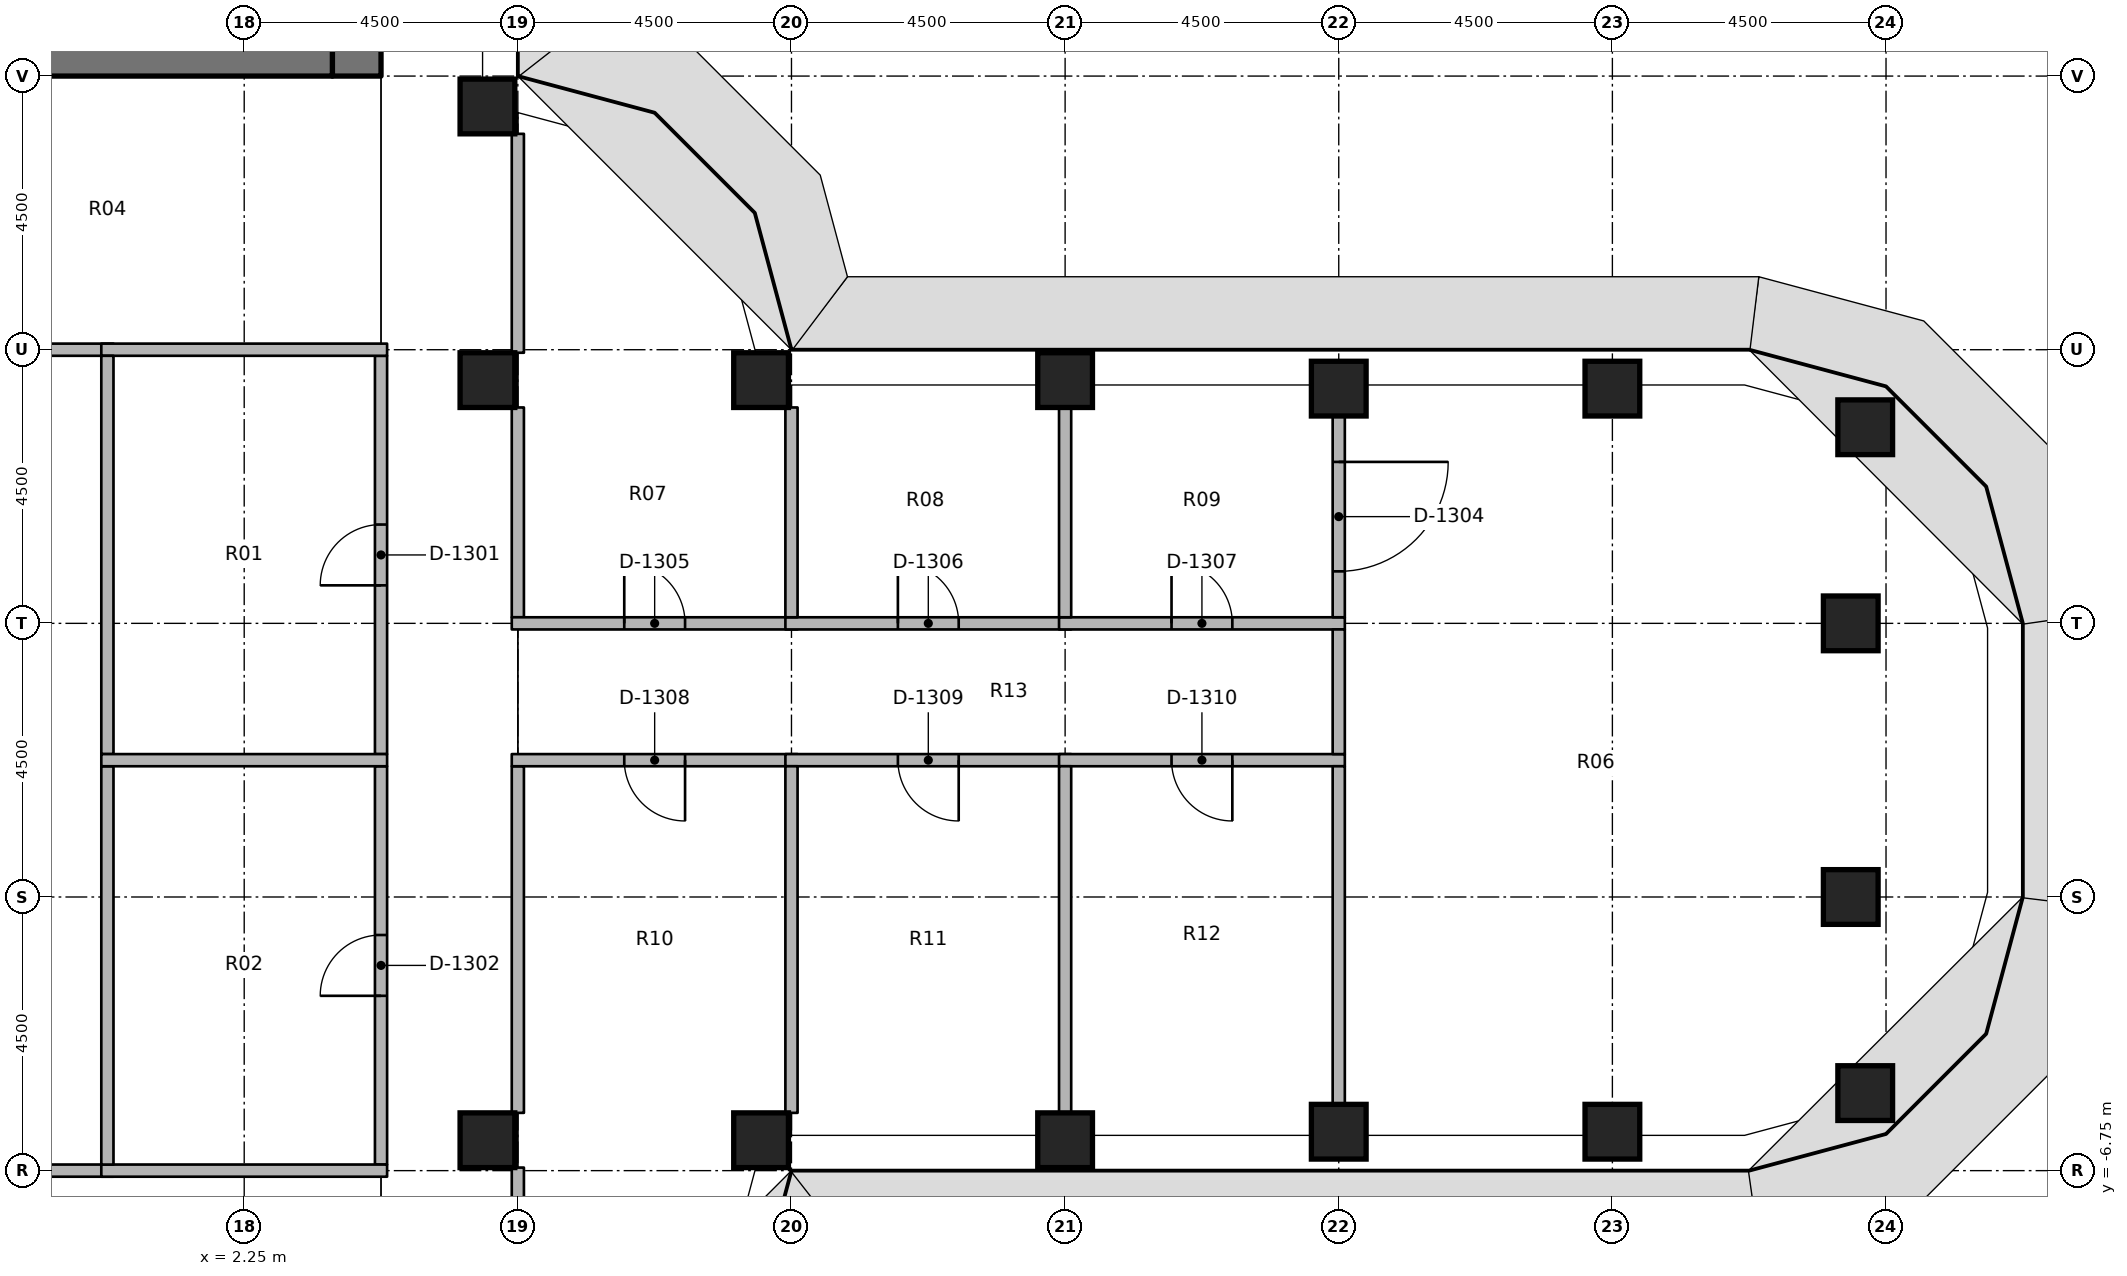
"""IFC4 building model, lengths in metres.
Left out: names, types, materials, properties, quantities, classifications, styles, units other than length and angle.
Written with IfcOpenShell. Run it as: python <this file> out.ifc"""

import sys

from ifc_helpers import new_model, si_unit, direction, frame, frame_2d, origin, origin_2d, place, context, subcontext, project, spatial, rectangle, extrude, element, fill, save


model = new_model("IFC4")
c1 = context("Model", 3, precision=1e-05, world=origin(), true_north=direction((0.0, 1.0)))
c2 = subcontext(c1, "Body", "Model", "MODEL_VIEW")
j1 = project(units=[si_unit("LENGTHUNIT", "METRE"), si_unit("PLANEANGLEUNIT", "RADIAN")], contexts=[c1])
p1 = place(None, origin())
s1 = spatial("IfcSite", under=j1, at=p1, CompositionType="ELEMENT")
p2 = place(p1, origin())
s2 = spatial("IfcBuilding", under=s1, at=p2, CompositionType="ELEMENT")
p3 = place(p2, frame((0.0, 0.0, 132.2)))
s3 = spatial("IfcBuildingStorey", under=s2, at=p3, CompositionType="ELEMENT", Elevation=132.2)
for number, where, z_axis, x_axis in (
    (1, (6.25, -6.25, 0.0), (0.0, 0.0, 1.0), (1.0, 0.0, 0.0)),
    (2, (6.25, 6.25, 0.0), (0.0, 0.0, 1.0), (1.0, 0.0, 0.0)),
    (3, (6.25, 10.75, 0.0), (0.0, 0.0, 1.0), (1.0, 0.0, 0.0)),
    (4, (10.75, -6.25, 0.0), (0.0, 0.0, 1.0), (1.0, 0.0, 0.0)),
    (5, (10.75, 6.25, 0.0), (0.0, 0.0, 1.0), (1.0, 0.0, 0.0)),
    (6, (15.75, -6.25, 0.0), (0.0, 0.0, 1.0), (1.0, 0.0, 0.0)),
    (7, (15.75, 6.25, 0.0), (0.0, 0.0, 1.0), (1.0, 0.0, 0.0)),
    (8, (20.25, -6.11, 0.0), (0.0, 0.0, 1.0), (1.0, 0.0, 0.0)),
    (9, (20.25, 6.11, 0.0), (0.0, 0.0, 1.0), (1.0, 0.0, 0.0)),
    (10, (24.75, -6.11, 0.0), (0.0, 0.0, 1.0), (1.0, 0.0, 0.0)),
    (11, (24.75, 6.11, 0.0), (0.0, 0.0, 1.0), (1.0, 0.0, 0.0)),
    (12, (28.908, -5.475, 0.0), (0.0, 0.0, 1.0), (1.0, 0.0, 0.0)),
    (13, (28.67, -2.25, 0.0), (0.0, 0.0, 1.0), (1.0, 0.0, 0.0)),
    (14, (28.67, 2.25, 0.0), (0.0, 0.0, 1.0), (1.0, 0.0, 0.0)),
    (15, (28.908, 5.475, 0.0), (0.0, 0.0, 1.0), (1.0, 0.0, 0.0)),
):
    element("IfcColumn", number, at=place(p3, frame(where, z_axis=z_axis, x_axis=x_axis)), inside=s3, PredefinedType="COLUMN", context=c2, shape_type="SweptSolid", body=[
        extrude(rectangle(XDim=0.9, YDim=0.9, at=origin_2d()), origin(), (0.0, 0.0, 1.0), 3.65),
    ])
p4 = place(p3, frame((4.1, 11.25, 0.0), z_axis=(0.0, 0.0, 1.0), x_axis=(0.0, 1.0, 0.0)))
e16 = element("IfcWall", 16, at=p4, inside=s3, PredefinedType="SHEAR", context=c2, shape_type="SweptSolid", body=[
    extrude(rectangle(XDim=15.0, YDim=0.8, at=frame_2d((7.5, 0.0))), origin(), (0.0, 0.0, 1.0), 3.8),
])
p5 = place(p4, frame((7.15, 0.0, 0.0)))
e17 = element("IfcOpeningElement", 17, at=p5, cuts=e16, PredefinedType="OPENING", context=c2, shape_type="SweptSolid", body=[
    extrude(rectangle(XDim=1.5, YDim=2.3, at=frame_2d((0.75, 1.15))), frame((0.0, 0.41, 0.0), z_axis=(0.0, -1.0, 0.0), x_axis=(1.0, 0.0, 0.0)), (0.0, 0.0, 1.0), 0.82),
])
p6 = place(p4, frame((5.55, 0.0, 0.0)))
e18 = element("IfcOpeningElement", 18, at=p6, cuts=e16, PredefinedType="OPENING", context=c2, shape_type="SweptSolid", body=[
    extrude(rectangle(XDim=1.2, YDim=2.1, at=frame_2d((0.6, 1.05))), frame((0.0, 0.41, 0.0), z_axis=(0.0, -1.0, 0.0), x_axis=(1.0, 0.0, 0.0)), (0.0, 0.0, 1.0), 0.82),
])
p7 = place(p3, frame((-3.7, 11.65, 0.0), z_axis=(0.0, 0.0, 1.0), x_axis=(1.0, 0.0, 0.0)))
e19 = element("IfcWall", 19, at=p7, inside=s3, PredefinedType="SHEAR", context=c2, shape_type="SweptSolid", body=[
    extrude(rectangle(XDim=7.4, YDim=0.8, at=frame_2d((3.7, 0.0))), origin(), (0.0, 0.0, 1.0), 3.8),
])
p8 = place(p3, frame((4.5, 0.1, 0.0), z_axis=(0.0, 0.0, 1.0), x_axis=(0.0, 1.0, 0.0)))
e20 = element("IfcWall", 20, at=p8, inside=s3, PredefinedType="PARTITIONING", context=c2, shape_type="SweptSolid", body=[
    extrude(rectangle(XDim=6.55, YDim=0.2, at=frame_2d((3.275, 0.0))), origin(), (0.0, 0.0, 1.0), 2.738),
])
p9 = place(p8, frame((2.775, 0.0, 0.0)))
e21 = element("IfcOpeningElement", 21, at=p9, cuts=e20, PredefinedType="OPENING", context=c2, shape_type="SweptSolid", body=[
    extrude(rectangle(XDim=1.0, YDim=2.1, at=frame_2d((0.5, 1.05))), frame((0.0, 0.11, 0.0), z_axis=(0.0, -1.0, 0.0), x_axis=(1.0, 0.0, 0.0)), (0.0, 0.0, 1.0), 0.22),
])
p10 = place(p3, frame((4.5, -6.65, 0.0), z_axis=(0.0, 0.0, 1.0), x_axis=(0.0, 1.0, 0.0)))
e22 = element("IfcWall", 22, at=p10, inside=s3, PredefinedType="PARTITIONING", context=c2, shape_type="SweptSolid", body=[
    extrude(rectangle(XDim=6.55, YDim=0.2, at=frame_2d((3.275, 0.0))), origin(), (0.0, 0.0, 1.0), 2.738),
])
p11 = place(p10, frame((2.775, 0.0, 0.0)))
e23 = element("IfcOpeningElement", 23, at=p11, cuts=e22, PredefinedType="OPENING", context=c2, shape_type="SweptSolid", body=[
    extrude(rectangle(XDim=1.0, YDim=2.1, at=frame_2d((0.5, 1.05))), frame((0.0, 0.11, 0.0), z_axis=(0.0, -1.0, 0.0), x_axis=(1.0, 0.0, 0.0)), (0.0, 0.0, 1.0), 0.22),
])
p12 = place(p3, frame((6.75, 2.35, 0.0), z_axis=(0.0, 0.0, 1.0), x_axis=(0.0, 1.0, 0.0)))
e24 = element("IfcWall", 24, at=p12, inside=s3, PredefinedType="PARTITIONING", context=c2, shape_type="SweptSolid", body=[
    extrude(rectangle(XDim=3.45, YDim=0.2, at=frame_2d((1.725, 0.0))), origin(), (0.0, 0.0, 1.0), 2.738),
])
for number, where, z_axis, x_axis in (
    (25, (6.75, 6.7, 0.0), (0.0, 0.0, 1.0), (0.0, 1.0, 0.0)),
    (26, (6.75, -10.3, 0.0), (0.0, 0.0, 1.0), (0.0, 1.0, 0.0)),
):
    element("IfcWall", number, at=place(p3, frame(where, z_axis=z_axis, x_axis=x_axis)), inside=s3, PredefinedType="PARTITIONING", context=c2, shape_type="SweptSolid", body=[
        extrude(rectangle(XDim=3.6, YDim=0.2, at=frame_2d((1.8, 0.0))), origin(), (0.0, 0.0, 1.0), 2.738),
    ])
p13 = place(p3, frame((6.75, -5.8, 0.0), z_axis=(0.0, 0.0, 1.0), x_axis=(0.0, 1.0, 0.0)))
e27 = element("IfcWall", 27, at=p13, inside=s3, PredefinedType="PARTITIONING", context=c2, shape_type="SweptSolid", body=[
    extrude(rectangle(XDim=5.7, YDim=0.2, at=frame_2d((2.85, 0.0))), origin(), (0.0, 0.0, 1.0), 2.738),
])
for number, where, z_axis, x_axis in (
    (28, (-4.6, 6.75, 0.0), (0.0, 0.0, 1.0), (1.0, 0.0, 0.0)),
    (29, (-0.1, 6.75, 0.0), (0.0, 0.0, 1.0), (1.0, 0.0, 0.0)),
    (30, (-4.6, -6.75, 0.0), (0.0, 0.0, 1.0), (1.0, 0.0, 0.0)),
    (31, (-0.1, -6.75, 0.0), (0.0, 0.0, 1.0), (1.0, 0.0, 0.0)),
):
    element("IfcWall", number, at=place(p3, frame(where, z_axis=z_axis, x_axis=x_axis)), inside=s3, PredefinedType="PARTITIONING", context=c2, shape_type="SweptSolid", body=[
        extrude(rectangle(XDim=4.7, YDim=0.2, at=frame_2d((2.35, 0.0))), origin(), (0.0, 0.0, 1.0), 2.738),
    ])
for number, where, z_axis, x_axis in (
    (32, (0.0, 0.1, 0.0), (0.0, 0.0, 1.0), (0.0, 1.0, 0.0)),
    (33, (0.0, -6.65, 0.0), (0.0, 0.0, 1.0), (0.0, 1.0, 0.0)),
):
    element("IfcWall", number, at=place(p3, frame(where, z_axis=z_axis, x_axis=x_axis)), inside=s3, PredefinedType="PARTITIONING", context=c2, shape_type="SweptSolid", body=[
        extrude(rectangle(XDim=6.55, YDim=0.2, at=frame_2d((3.275, 0.0))), origin(), (0.0, 0.0, 1.0), 2.738),
    ])
p14 = place(p3, frame((-0.1, 0.0, 0.0), z_axis=(0.0, 0.0, 1.0), x_axis=(1.0, 0.0, 0.0)))
e34 = element("IfcWall", 34, at=p14, inside=s3, PredefinedType="PARTITIONING", context=c2, shape_type="SweptSolid", body=[
    extrude(rectangle(XDim=4.7, YDim=0.2, at=frame_2d((2.35, 0.0))), origin(), (0.0, 0.0, 1.0), 2.738),
])
p15 = place(p3, frame((6.65, 2.25, 0.0), z_axis=(0.0, 0.0, 1.0), x_axis=(1.0, 0.0, 0.0)))
e35 = element("IfcWall", 35, at=p15, inside=s3, PredefinedType="PARTITIONING", context=c2, shape_type="SweptSolid", body=[
    extrude(rectangle(XDim=4.7, YDim=0.2, at=frame_2d((2.35, 0.0))), origin(), (0.0, 0.0, 1.0), 2.738),
])
p16 = place(p15, frame((1.85, 0.0, 0.0)))
e36 = element("IfcOpeningElement", 36, at=p16, cuts=e35, PredefinedType="OPENING", context=c2, shape_type="SweptSolid", body=[
    extrude(rectangle(XDim=1.0, YDim=2.1, at=frame_2d((0.5, 1.05))), frame((0.0, 0.11, 0.0), z_axis=(0.0, -1.0, 0.0), x_axis=(1.0, 0.0, 0.0)), (0.0, 0.0, 1.0), 0.22),
])
p17 = place(p3, frame((11.35, 0.0, 0.0), z_axis=(0.0, 0.0, 1.0), x_axis=(-1.0, 0.0, 0.0)))
e37 = element("IfcWall", 37, at=p17, inside=s3, PredefinedType="PARTITIONING", context=c2, shape_type="SweptSolid", body=[
    extrude(rectangle(XDim=4.7, YDim=0.2, at=frame_2d((2.35, 0.0))), origin(), (0.0, 0.0, 1.0), 2.738),
])
p18 = place(p17, frame((1.85, 0.0, 0.0)))
e38 = element("IfcOpeningElement", 38, at=p18, cuts=e37, PredefinedType="OPENING", context=c2, shape_type="SweptSolid", body=[
    extrude(rectangle(XDim=1.0, YDim=2.1, at=frame_2d((0.5, 1.05))), frame((0.0, 0.11, 0.0), z_axis=(0.0, -1.0, 0.0), x_axis=(1.0, 0.0, 0.0)), (0.0, 0.0, 1.0), 0.22),
])
p19 = place(p3, frame((11.15, 2.25, 0.0), z_axis=(0.0, 0.0, 1.0), x_axis=(1.0, 0.0, 0.0)))
e39 = element("IfcWall", 39, at=p19, inside=s3, PredefinedType="PARTITIONING", context=c2, shape_type="SweptSolid", body=[
    extrude(rectangle(XDim=4.7, YDim=0.2, at=frame_2d((2.35, 0.0))), origin(), (0.0, 0.0, 1.0), 2.738),
])
p20 = place(p19, frame((1.85, 0.0, 0.0)))
e40 = element("IfcOpeningElement", 40, at=p20, cuts=e39, PredefinedType="OPENING", context=c2, shape_type="SweptSolid", body=[
    extrude(rectangle(XDim=1.0, YDim=2.1, at=frame_2d((0.5, 1.05))), frame((0.0, 0.11, 0.0), z_axis=(0.0, -1.0, 0.0), x_axis=(1.0, 0.0, 0.0)), (0.0, 0.0, 1.0), 0.22),
])
p21 = place(p3, frame((15.65, 2.25, 0.0), z_axis=(0.0, 0.0, 1.0), x_axis=(1.0, 0.0, 0.0)))
e41 = element("IfcWall", 41, at=p21, inside=s3, PredefinedType="PARTITIONING", context=c2, shape_type="SweptSolid", body=[
    extrude(rectangle(XDim=4.7, YDim=0.2, at=frame_2d((2.35, 0.0))), origin(), (0.0, 0.0, 1.0), 2.738),
])
p22 = place(p21, frame((1.85, 0.0, 0.0)))
e42 = element("IfcOpeningElement", 42, at=p22, cuts=e41, PredefinedType="OPENING", context=c2, shape_type="SweptSolid", body=[
    extrude(rectangle(XDim=1.0, YDim=2.1, at=frame_2d((0.5, 1.05))), frame((0.0, 0.11, 0.0), z_axis=(0.0, -1.0, 0.0), x_axis=(1.0, 0.0, 0.0)), (0.0, 0.0, 1.0), 0.22),
])
p23 = place(p3, frame((15.85, 0.0, 0.0), z_axis=(0.0, 0.0, 1.0), x_axis=(-1.0, 0.0, 0.0)))
e43 = element("IfcWall", 43, at=p23, inside=s3, PredefinedType="PARTITIONING", context=c2, shape_type="SweptSolid", body=[
    extrude(rectangle(XDim=4.7, YDim=0.2, at=frame_2d((2.35, 0.0))), origin(), (0.0, 0.0, 1.0), 2.738),
])
p24 = place(p23, frame((1.85, 0.0, 0.0)))
e44 = element("IfcOpeningElement", 44, at=p24, cuts=e43, PredefinedType="OPENING", context=c2, shape_type="SweptSolid", body=[
    extrude(rectangle(XDim=1.0, YDim=2.1, at=frame_2d((0.5, 1.05))), frame((0.0, 0.11, 0.0), z_axis=(0.0, -1.0, 0.0), x_axis=(1.0, 0.0, 0.0)), (0.0, 0.0, 1.0), 0.22),
])
p25 = place(p3, frame((20.35, 0.0, 0.0), z_axis=(0.0, 0.0, 1.0), x_axis=(-1.0, 0.0, 0.0)))
e45 = element("IfcWall", 45, at=p25, inside=s3, PredefinedType="PARTITIONING", context=c2, shape_type="SweptSolid", body=[
    extrude(rectangle(XDim=4.7, YDim=0.2, at=frame_2d((2.35, 0.0))), origin(), (0.0, 0.0, 1.0), 2.738),
])
p26 = place(p25, frame((1.85, 0.0, 0.0)))
e46 = element("IfcOpeningElement", 46, at=p26, cuts=e45, PredefinedType="OPENING", context=c2, shape_type="SweptSolid", body=[
    extrude(rectangle(XDim=1.0, YDim=2.1, at=frame_2d((0.5, 1.05))), frame((0.0, 0.11, 0.0), z_axis=(0.0, -1.0, 0.0), x_axis=(1.0, 0.0, 0.0)), (0.0, 0.0, 1.0), 0.22),
])
p27 = place(p3, frame((20.25, 0.1, 0.0), z_axis=(0.0, 0.0, 1.0), x_axis=(0.0, 1.0, 0.0)))
e47 = element("IfcWall", 47, at=p27, inside=s3, PredefinedType="PARTITIONING", context=c2, shape_type="SweptSolid", body=[
    extrude(rectangle(XDim=2.05, YDim=0.2, at=frame_2d((1.025, 0.0))), origin(), (0.0, 0.0, 1.0), 2.738),
])
p28 = place(p3, frame((11.25, 2.35, 0.0), z_axis=(0.0, 0.0, 1.0), x_axis=(0.0, 1.0, 0.0)))
e48 = element("IfcWall", 48, at=p28, inside=s3, PredefinedType="PARTITIONING", context=c2, shape_type="SweptSolid", body=[
    extrude(rectangle(XDim=3.45, YDim=0.2, at=frame_2d((1.725, 0.0))), origin(), (0.0, 0.0, 1.0), 2.738),
])
p29 = place(p3, frame((11.25, -5.8, 0.0), z_axis=(0.0, 0.0, 1.0), x_axis=(0.0, 1.0, 0.0)))
e49 = element("IfcWall", 49, at=p29, inside=s3, PredefinedType="PARTITIONING", context=c2, shape_type="SweptSolid", body=[
    extrude(rectangle(XDim=5.7, YDim=0.2, at=frame_2d((2.85, 0.0))), origin(), (0.0, 0.0, 1.0), 2.738),
])
p30 = place(p3, frame((15.75, 2.35, 0.0), z_axis=(0.0, 0.0, 1.0), x_axis=(0.0, 1.0, 0.0)))
e50 = element("IfcWall", 50, at=p30, inside=s3, PredefinedType="PARTITIONING", context=c2, shape_type="SweptSolid", body=[
    extrude(rectangle(XDim=3.45, YDim=0.2, at=frame_2d((1.725, 0.0))), origin(), (0.0, 0.0, 1.0), 2.738),
])
p31 = place(p3, frame((20.25, 5.66, 0.0), z_axis=(0.0, 0.0, 1.0), x_axis=(0.0, -1.0, 0.0)))
e51 = element("IfcWall", 51, at=p31, inside=s3, PredefinedType="PARTITIONING", context=c2, shape_type="SweptSolid", body=[
    extrude(rectangle(XDim=3.31, YDim=0.2, at=frame_2d((1.655, 0.0))), origin(), (0.0, 0.0, 1.0), 2.738),
])
p32 = place(p31, frame((0.755, 0.0, 0.0)))
e52 = element("IfcOpeningElement", 52, at=p32, cuts=e51, PredefinedType="OPENING", context=c2, shape_type="SweptSolid", body=[
    extrude(rectangle(XDim=1.8, YDim=2.1, at=frame_2d((0.9, 1.05))), frame((0.0, 0.11, 0.0), z_axis=(0.0, -1.0, 0.0), x_axis=(1.0, 0.0, 0.0)), (0.0, 0.0, 1.0), 0.22),
])
p33 = place(p3, frame((15.75, -5.8, 0.0), z_axis=(0.0, 0.0, 1.0), x_axis=(0.0, 1.0, 0.0)))
e53 = element("IfcWall", 53, at=p33, inside=s3, PredefinedType="PARTITIONING", context=c2, shape_type="SweptSolid", body=[
    extrude(rectangle(XDim=5.7, YDim=0.2, at=frame_2d((2.85, 0.0))), origin(), (0.0, 0.0, 1.0), 2.738),
])
p34 = place(p3, frame((20.25, -5.66, 0.0), z_axis=(0.0, 0.0, 1.0), x_axis=(0.0, 1.0, 0.0)))
e54 = element("IfcWall", 54, at=p34, inside=s3, PredefinedType="PARTITIONING", context=c2, shape_type="SweptSolid", body=[
    extrude(rectangle(XDim=5.56, YDim=0.2, at=frame_2d((2.78, 0.0))), origin(), (0.0, 0.0, 1.0), 2.738),
])
p35 = place(p9, origin())
e55 = element("IfcDoor", 55, at=p35, inside=s3, OperationType="SINGLE_SWING_LEFT", PredefinedType="DOOR", context=c2, shape_type="SweptSolid", body=[
    extrude(rectangle(XDim=1.0, YDim=2.1, at=frame_2d((0.5, 1.05))), frame((0.0, 0.025, 0.0), z_axis=(0.0, -1.0, 0.0), x_axis=(1.0, 0.0, 0.0)), (0.0, 0.0, 1.0), 0.05),
])
fill(e21, e55)
p36 = place(p11, origin())
e56 = element("IfcDoor", 56, at=p36, inside=s3, OperationType="SINGLE_SWING_RIGHT", PredefinedType="DOOR", context=c2, shape_type="SweptSolid", body=[
    extrude(rectangle(XDim=1.0, YDim=2.1, at=frame_2d((0.5, 1.05))), frame((0.0, 0.025, 0.0), z_axis=(0.0, -1.0, 0.0), x_axis=(1.0, 0.0, 0.0)), (0.0, 0.0, 1.0), 0.05),
])
fill(e23, e56)
p37 = place(p32, origin())
e57 = element("IfcDoor", 57, at=p37, inside=s3, OperationType="DOUBLE_DOOR_SINGLE_SWING", PredefinedType="DOOR", context=c2, shape_type="SweptSolid", body=[
    extrude(rectangle(XDim=1.8, YDim=2.1, at=frame_2d((0.9, 1.05))), frame((0.0, 0.025, 0.0), z_axis=(0.0, -1.0, 0.0), x_axis=(1.0, 0.0, 0.0)), (0.0, 0.0, 1.0), 0.05),
])
fill(e52, e57)
p38 = place(p16, origin())
e58 = element("IfcDoor", 58, at=p38, inside=s3, OperationType="SINGLE_SWING_RIGHT", PredefinedType="DOOR", context=c2, shape_type="SweptSolid", body=[
    extrude(rectangle(XDim=1.0, YDim=2.1, at=frame_2d((0.5, 1.05))), frame((0.0, 0.025, 0.0), z_axis=(0.0, -1.0, 0.0), x_axis=(1.0, 0.0, 0.0)), (0.0, 0.0, 1.0), 0.05),
])
fill(e36, e58)
p39 = place(p20, origin())
e59 = element("IfcDoor", 59, at=p39, inside=s3, OperationType="SINGLE_SWING_RIGHT", PredefinedType="DOOR", context=c2, shape_type="SweptSolid", body=[
    extrude(rectangle(XDim=1.0, YDim=2.1, at=frame_2d((0.5, 1.05))), frame((0.0, 0.025, 0.0), z_axis=(0.0, -1.0, 0.0), x_axis=(1.0, 0.0, 0.0)), (0.0, 0.0, 1.0), 0.05),
])
fill(e40, e59)
p40 = place(p22, origin())
e60 = element("IfcDoor", 60, at=p40, inside=s3, OperationType="SINGLE_SWING_LEFT", PredefinedType="DOOR", context=c2, shape_type="SweptSolid", body=[
    extrude(rectangle(XDim=1.0, YDim=2.1, at=frame_2d((0.5, 1.05))), frame((0.0, 0.025, 0.0), z_axis=(0.0, -1.0, 0.0), x_axis=(1.0, 0.0, 0.0)), (0.0, 0.0, 1.0), 0.05),
])
fill(e42, e60)
p41 = place(p18, origin())
e61 = element("IfcDoor", 61, at=p41, inside=s3, OperationType="SINGLE_SWING_RIGHT", PredefinedType="DOOR", context=c2, shape_type="SweptSolid", body=[
    extrude(rectangle(XDim=1.0, YDim=2.1, at=frame_2d((0.5, 1.05))), frame((0.0, 0.025, 0.0), z_axis=(0.0, -1.0, 0.0), x_axis=(1.0, 0.0, 0.0)), (0.0, 0.0, 1.0), 0.05),
])
fill(e38, e61)
p42 = place(p24, origin())
e62 = element("IfcDoor", 62, at=p42, inside=s3, OperationType="SINGLE_SWING_RIGHT", PredefinedType="DOOR", context=c2, shape_type="SweptSolid", body=[
    extrude(rectangle(XDim=1.0, YDim=2.1, at=frame_2d((0.5, 1.05))), frame((0.0, 0.025, 0.0), z_axis=(0.0, -1.0, 0.0), x_axis=(1.0, 0.0, 0.0)), (0.0, 0.0, 1.0), 0.05),
])
fill(e44, e62)
p43 = place(p26, origin())
e63 = element("IfcDoor", 63, at=p43, inside=s3, OperationType="SINGLE_SWING_RIGHT", PredefinedType="DOOR", context=c2, shape_type="SweptSolid", body=[
    extrude(rectangle(XDim=1.0, YDim=2.1, at=frame_2d((0.5, 1.05))), frame((0.0, 0.025, 0.0), z_axis=(0.0, -1.0, 0.0), x_axis=(1.0, 0.0, 0.0)), (0.0, 0.0, 1.0), 0.05),
])
fill(e46, e63)
save(model, sys.argv[1])
